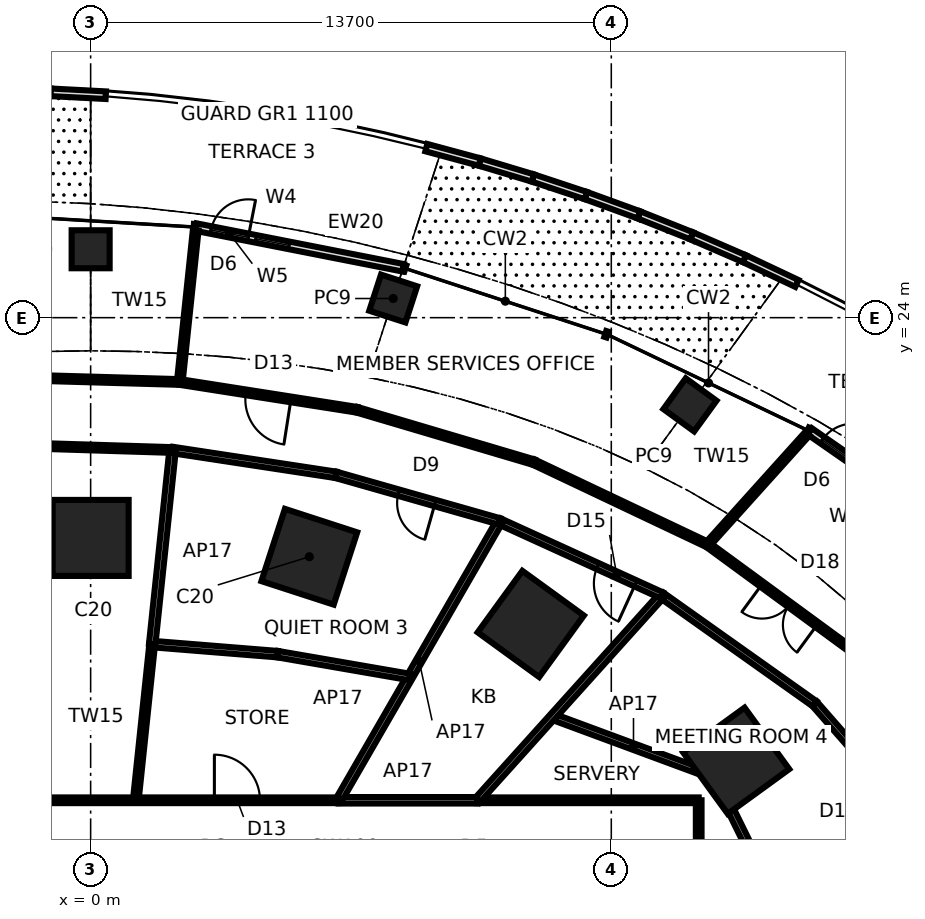
"""IFC4 building model, lengths in metres.
Left out: names, types, materials, properties, quantities, classifications, styles, units other than length and angle.
Written with IfcOpenShell. Run it as: python <this file> out.ifc"""

import sys

from ifc_helpers import new_model, si_unit, direction, frame, frame_2d, origin, origin_2d, place, context, subcontext, project, spatial, rectangle, extrude, element, fill, save


model = new_model("IFC4")
c1 = context("Model", 3, precision=1e-05, world=origin(), true_north=direction((0.0, 1.0)))
c2 = subcontext(c1, "Body", "Model", "MODEL_VIEW")
j1 = project(units=[si_unit("LENGTHUNIT", "METRE"), si_unit("PLANEANGLEUNIT", "RADIAN")], contexts=[c1])
p1 = place(None, origin())
s1 = spatial("IfcSite", under=j1, at=p1, CompositionType="ELEMENT")
p2 = place(p1, origin())
s2 = spatial("IfcBuilding", under=s1, at=p2, CompositionType="ELEMENT")
p3 = place(p2, frame((0.0, 0.0, 15.1)))
s3 = spatial("IfcBuildingStorey", under=s2, at=p3, CompositionType="ELEMENT", Elevation=15.1)
for number, where, z_axis, x_axis in (
    (1, (16.986, 12.341, 0.0), (0.0, 0.0, 1.0), (0.809, 0.588, 0.0)),
    (2, (11.581, 15.94, 0.0), (0.0, 0.0, 1.0), (0.588, 0.809, 0.0)),
    (3, (5.754, 17.708, 0.0), (0.0, 0.0, 1.0), (0.309, 0.951, 0.0)),
    (4, (0.0, 18.204, 0.0), (0.0, 0.0, 1.0), (0.0, 1.0, 0.0)),
):
    element("IfcColumn", number, at=place(p3, frame(where, z_axis=z_axis, x_axis=x_axis)), inside=s3, PredefinedType="COLUMN", context=c2, shape_type="SweptSolid", body=[
        extrude(rectangle(XDim=2.0, YDim=2.0, at=origin_2d()), origin(), (0.0, 0.0, 1.0), 4.5),
    ])
for number, where, z_axis, x_axis in (
    (5, (15.77, 21.705, 0.0), (0.0, 0.0, 1.0), (0.588, 0.809, 0.0)),
    (6, (7.962, 24.504, 0.0), (0.0, 0.0, 1.0), (0.309, 0.951, 0.0)),
    (7, (0.0, 25.8, 0.0), (0.0, 0.0, 1.0), (0.0, 1.0, 0.0)),
):
    element("IfcColumn", number, at=place(p3, frame(where, z_axis=z_axis, x_axis=x_axis)), inside=s3, PredefinedType="COLUMN", context=c2, shape_type="SweptSolid", body=[
        extrude(rectangle(XDim=1.0, YDim=1.0, at=origin_2d()), origin(), (0.0, 0.0, 1.0), 4.5),
    ])
p4 = place(p3, frame((24.03, 17.459, 0.0), z_axis=(0.0, 0.0, 1.0), x_axis=(-0.821240808498, 0.570581750897, 0.0)))
e8 = element("IfcWall", 8, at=p4, inside=s3, PredefinedType="SOLIDWALL", context=c2, shape_type="SweptSolid", body=[
    extrude(rectangle(XDim=6.225, YDim=0.2, at=frame_2d((3.112, 0.0))), origin(), (0.0, 0.0, 1.0), 4.3),
])
p5 = place(p4, frame((4.825, 0.0, 0.0)))
e9 = element("IfcOpeningElement", 9, at=p5, cuts=e8, PredefinedType="OPENING", context=c2, shape_type="SweptSolid", body=[
    extrude(rectangle(XDim=1.0, YDim=2.4, at=frame_2d((0.5, 1.2))), frame((0.0, 0.11, 0.0), z_axis=(0.0, -1.0, 0.0), x_axis=(1.0, 0.0, 0.0)), (0.0, 0.0, 1.0), 0.22),
])
p6 = place(p4, frame((3.725, 0.0, 0.3)))
e10 = element("IfcOpeningElement", 10, at=p6, cuts=e8, PredefinedType="OPENING", context=c2, shape_type="SweptSolid", body=[
    extrude(rectangle(XDim=0.9, YDim=2.1, at=frame_2d((0.45, 1.05))), frame((0.0, 0.11, 0.0), z_axis=(0.0, -1.0, 0.0), x_axis=(1.0, 0.0, 0.0)), (0.0, 0.0, 1.0), 0.22),
])
p7 = place(p4, frame((4.825, 0.0, 2.7)))
e11 = element("IfcOpeningElement", 11, at=p7, cuts=e8, PredefinedType="OPENING", context=c2, shape_type="SweptSolid", body=[
    extrude(rectangle(XDim=1.0, YDim=0.6, at=frame_2d((0.5, 0.3))), frame((0.0, 0.11, 0.0), z_axis=(0.0, -1.0, 0.0), x_axis=(1.0, 0.0, 0.0)), (0.0, 0.0, 1.0), 0.22),
])
p8 = place(p3, frame((8.225, 25.312, 0.0), z_axis=(0.0, 0.0, 1.0), x_axis=(-0.981250898219, 0.192734726359, 0.0)))
e12 = element("IfcWall", 12, at=p8, inside=s3, PredefinedType="SOLIDWALL", context=c2, shape_type="SweptSolid", body=[
    extrude(rectangle(XDim=5.556, YDim=0.2, at=frame_2d((2.778, 0.0))), origin(), (0.0, 0.0, 1.0), 4.3),
])
p9 = place(p8, frame((4.156, 0.0, 0.0)))
e13 = element("IfcOpeningElement", 13, at=p9, cuts=e12, PredefinedType="OPENING", context=c2, shape_type="SweptSolid", body=[
    extrude(rectangle(XDim=1.0, YDim=2.4, at=frame_2d((0.5, 1.2))), frame((0.0, 0.11, 0.0), z_axis=(0.0, -1.0, 0.0), x_axis=(1.0, 0.0, 0.0)), (0.0, 0.0, 1.0), 0.22),
])
p10 = place(p8, frame((3.056, 0.0, 0.3)))
e14 = element("IfcOpeningElement", 14, at=p10, cuts=e12, PredefinedType="OPENING", context=c2, shape_type="SweptSolid", body=[
    extrude(rectangle(XDim=0.9, YDim=2.1, at=frame_2d((0.45, 1.05))), frame((0.0, 0.11, 0.0), z_axis=(0.0, -1.0, 0.0), x_axis=(1.0, 0.0, 0.0)), (0.0, 0.0, 1.0), 0.22),
])
p11 = place(p8, frame((4.156, 0.0, 2.7)))
e15 = element("IfcOpeningElement", 15, at=p11, cuts=e12, PredefinedType="OPENING", context=c2, shape_type="SweptSolid", body=[
    extrude(rectangle(XDim=1.0, YDim=0.6, at=frame_2d((0.5, 0.3))), frame((0.0, 0.11, 0.0), z_axis=(0.0, -1.0, 0.0), x_axis=(1.0, 0.0, 0.0)), (0.0, 0.0, 1.0), 0.22),
])
p12 = place(p3, frame((18.585, 24.9, 0.0), z_axis=(0.0, 0.0, 1.0), x_axis=(-0.904481611799, 0.426512618709, 0.0)))
e16 = element("IfcWall", 16, at=p12, inside=s3, PredefinedType="PARAPET", context=c2, shape_type="SweptSolid", body=[
    extrude(rectangle(XDim=1.528, YDim=0.2, at=frame_2d((0.764, 0.0))), origin(), (0.0, 0.0, 1.0), 1.1),
])
p13 = place(p3, frame((17.203, 25.552, 0.0), z_axis=(0.0, 0.0, 1.0), x_axis=(-0.917549730741, 0.39762104021, 0.0)))
e17 = element("IfcWall", 17, at=p13, inside=s3, PredefinedType="PARAPET", context=c2, shape_type="SweptSolid", body=[
    extrude(rectangle(XDim=1.511, YDim=0.2, at=frame_2d((0.755, 0.0))), origin(), (0.0, 0.0, 1.0), 1.1),
])
p14 = place(p3, frame((15.816, 26.153, 0.0), z_axis=(0.0, 0.0, 1.0), x_axis=(-0.929273809552, 0.369391644303, 0.0)))
e18 = element("IfcWall", 18, at=p14, inside=s3, PredefinedType="PARAPET", context=c2, shape_type="SweptSolid", body=[
    extrude(rectangle(XDim=1.496, YDim=0.2, at=frame_2d((0.748, 0.0))), origin(), (0.0, 0.0, 1.0), 1.1),
])
p15 = place(p3, frame((14.427, 26.705, 0.0), z_axis=(0.0, 0.0, 1.0), x_axis=(-0.939735707592, 0.341901740091, 0.0)))
e19 = element("IfcWall", 19, at=p15, inside=s3, PredefinedType="PARAPET", context=c2, shape_type="SweptSolid", body=[
    extrude(rectangle(XDim=1.482, YDim=0.2, at=frame_2d((0.741, 0.0))), origin(), (0.0, 0.0, 1.0), 1.1),
])
p16 = place(p3, frame((13.033, 27.212, 0.0), z_axis=(0.0, 0.0, 1.0), x_axis=(-0.949196557005, 0.314683803476, 0.0)))
e20 = element("IfcWall", 20, at=p16, inside=s3, PredefinedType="PARAPET", context=c2, shape_type="SweptSolid", body=[
    extrude(rectangle(XDim=1.471, YDim=0.2, at=frame_2d((0.735, 0.0))), origin(), (0.0, 0.0, 1.0), 1.1),
])
p17 = place(p3, frame((11.637, 27.675, 0.0), z_axis=(0.0, 0.0, 1.0), x_axis=(-0.957683640583, 0.2878229396, 0.0)))
e21 = element("IfcWall", 21, at=p17, inside=s3, PredefinedType="PARAPET", context=c2, shape_type="SweptSolid", body=[
    extrude(rectangle(XDim=1.461, YDim=0.2, at=frame_2d((0.731, 0.0))), origin(), (0.0, 0.0, 1.0), 1.1),
])
p18 = place(p3, frame((10.238, 28.095, 0.0), z_axis=(0.0, 0.0, 1.0), x_axis=(-0.965419365496, 0.260701838744, 0.0)))
e22 = element("IfcWall", 22, at=p18, inside=s3, PredefinedType="PARAPET", context=c2, shape_type="SweptSolid", body=[
    extrude(rectangle(XDim=1.454, YDim=0.2, at=frame_2d((0.727, 0.0))), origin(), (0.0, 0.0, 1.0), 1.1),
])
p19 = place(p3, frame((0.398, 29.854, 0.0), z_axis=(0.0, 0.0, 1.0), x_axis=(-0.998632601242, 0.05227741134, 0.0)))
e23 = element("IfcWall", 23, at=p19, inside=s3, PredefinedType="PARAPET", context=c2, shape_type="SweptSolid", body=[
    extrude(rectangle(XDim=1.457, YDim=0.2, at=frame_2d((0.729, 0.0))), origin(), (0.0, 0.0, 1.0), 1.1),
])
p20 = place(p3, frame((16.0, 4.321, 0.0), z_axis=(0.0, 0.0, 1.0), x_axis=(0.0, 1.0, 0.0)))
e24 = element("IfcWall", 24, at=p20, inside=s3, PredefinedType="PARTITIONING", context=c2, shape_type="SweptSolid", body=[
    extrude(rectangle(XDim=6.979, YDim=0.15, at=frame_2d((3.49, 0.0))), origin(), (0.0, 0.0, 1.0), 4.3),
])
p21 = place(p20, frame((2.915, 0.0, 0.0)))
e25 = element("IfcOpeningElement", 25, at=p21, cuts=e24, PredefinedType="OPENING", context=c2, shape_type="SweptSolid", body=[
    extrude(rectangle(XDim=1.2, YDim=2.4, at=frame_2d((0.6, 1.2))), frame((0.0, 0.085, 0.0), z_axis=(0.0, -1.0, 0.0), x_axis=(1.0, 0.0, 0.0)), (0.0, 0.0, 1.0), 0.17),
])
p22 = place(p3, frame((19.049, 13.84, 0.0), z_axis=(0.0, 0.0, 1.0), x_axis=(0.658801352576, -0.752316939756, 0.0)))
e26 = element("IfcWall", 26, at=p22, inside=s3, PredefinedType="PARTITIONING", context=c2, shape_type="SweptSolid", body=[
    extrude(rectangle(XDim=5.125, YDim=0.17, at=frame_2d((2.562, 0.0))), origin(), (0.0, 0.0, 1.0), 4.3),
])
p23 = place(p22, frame((2.012, 0.0, 0.0)))
e27 = element("IfcOpeningElement", 27, at=p23, cuts=e26, PredefinedType="OPENING", context=c2, shape_type="SweptSolid", body=[
    extrude(rectangle(XDim=1.1, YDim=2.4, at=frame_2d((0.55, 1.2))), frame((0.0, 0.095, 0.0), z_axis=(0.0, -1.0, 0.0), x_axis=(1.0, 0.0, 0.0)), (0.0, 0.0, 1.0), 0.19),
])
p24 = place(p3, frame((16.413, 11.925, 0.0), z_axis=(0.0, 0.0, 1.0), x_axis=(0.44142043443, -0.897300395669, 0.0)))
e28 = element("IfcWall", 28, at=p24, inside=s3, PredefinedType="PARTITIONING", context=c2, shape_type="SweptSolid", body=[
    extrude(rectangle(XDim=4.221, YDim=0.17, at=frame_2d((2.111, 0.0))), origin(), (0.0, 0.0, 1.0), 4.3),
])
p25 = place(p3, frame((16.0, 11.3, 0.0), z_axis=(0.0, 0.0, 1.0), x_axis=(-1.0, 0.0, 0.0)))
e29 = element("IfcWall", 29, at=p25, inside=s3, PredefinedType="PARTITIONING", context=c2, shape_type="SweptSolid", body=[
    extrude(rectangle(XDim=5.825, YDim=0.15, at=frame_2d((2.913, 0.0))), origin(), (0.0, 0.0, 1.0), 4.3),
])
p26 = place(p3, frame((12.156, 13.5, 0.0), z_axis=(0.0, 0.0, 1.0), x_axis=(0.937814922048, -0.34713566798, 0.0)))
e30 = element("IfcWall", 30, at=p26, inside=s3, PredefinedType="PARTITIONING", context=c2, shape_type="SweptSolid", body=[
    extrude(rectangle(XDim=4.539, YDim=0.17, at=frame_2d((2.27, 0.0))), origin(), (0.0, 0.0, 1.0), 4.3),
])
p27 = place(p3, frame((15.029, 16.692, 0.0), z_axis=(0.0, 0.0, 1.0), x_axis=(0.815613464498, -0.578597162566, 0.0)))
e31 = element("IfcWall", 31, at=p27, inside=s3, PredefinedType="PARTITIONING", context=c2, shape_type="SweptSolid", body=[
    extrude(rectangle(XDim=4.929, YDim=0.17, at=frame_2d((2.464, 0.0))), origin(), (0.0, 0.0, 1.0), 4.3),
])
p28 = place(p3, frame((20.506, 14.898, 0.0), z_axis=(0.0, 0.0, 1.0), x_axis=(-0.806517819775, 0.591209782045, 0.0)))
e32 = element("IfcWall", 32, at=p28, inside=s3, PredefinedType="PARTITIONING", context=c2, shape_type="SweptSolid", body=[
    extrude(rectangle(XDim=5.296, YDim=0.15, at=frame_2d((2.648, 0.0))), origin(), (0.0, 0.0, 1.0), 4.3),
])
p29 = place(p28, frame((1.723, 0.0, 0.0)))
e33 = element("IfcOpeningElement", 33, at=p29, cuts=e32, PredefinedType="OPENING", context=c2, shape_type="SweptSolid", body=[
    extrude(rectangle(XDim=1.8, YDim=2.4, at=frame_2d((0.9, 1.2))), frame((0.0, 0.085, 0.0), z_axis=(0.0, -1.0, 0.0), x_axis=(1.0, 0.0, 0.0)), (0.0, 0.0, 1.0), 0.17),
])
p30 = place(p3, frame((15.029, 16.692, 0.0), z_axis=(0.0, 0.0, 1.0), x_axis=(-0.669122739593, -0.74315190867, 0.0)))
e34 = element("IfcWall", 34, at=p30, inside=s3, PredefinedType="PARTITIONING", context=c2, shape_type="SweptSolid", body=[
    extrude(rectangle(XDim=7.255, YDim=0.17, at=frame_2d((3.628, 0.0))), origin(), (0.0, 0.0, 1.0), 4.3),
])
p31 = place(p3, frame((16.234, 18.03, 0.0), z_axis=(0.0, 0.0, 1.0), x_axis=(0.669125969655, 0.743149000358, 0.0)))
e35 = element("IfcWall", 35, at=p31, inside=s3, PredefinedType="PARTITIONING", context=c2, shape_type="SweptSolid", body=[
    extrude(rectangle(XDim=3.931, YDim=0.15, at=frame_2d((1.966, 0.0))), origin(), (0.0, 0.0, 1.0), 4.3),
])
p32 = place(p3, frame((10.175, 11.3, 0.0), z_axis=(0.0, 0.0, 1.0), x_axis=(-1.0, 0.0, 0.0)))
e36 = element("IfcWall", 36, at=p32, inside=s3, PredefinedType="PARTITIONING", context=c2, shape_type="SweptSolid", body=[
    extrude(rectangle(XDim=3.65, YDim=0.17, at=frame_2d((1.825, 0.0))), origin(), (0.0, 0.0, 1.0), 4.3),
])
p33 = place(p3, frame((10.761, 18.639, 0.0), z_axis=(0.0, 0.0, 1.0), x_axis=(0.909832836999, -0.414974949507, 0.0)))
e37 = element("IfcWall", 37, at=p33, inside=s3, PredefinedType="PARTITIONING", context=c2, shape_type="SweptSolid", body=[
    extrude(rectangle(XDim=4.691, YDim=0.17, at=frame_2d((2.346, 0.0))), origin(), (0.0, 0.0, 1.0), 4.3),
])
p34 = place(p33, frame((2.836, 0.0, 0.0)))
e38 = element("IfcOpeningElement", 38, at=p34, cuts=e37, PredefinedType="OPENING", context=c2, shape_type="SweptSolid", body=[
    extrude(rectangle(XDim=1.1, YDim=2.4, at=frame_2d((0.55, 1.2))), frame((0.0, 0.095, 0.0), z_axis=(0.0, -1.0, 0.0), x_axis=(1.0, 0.0, 0.0)), (0.0, 0.0, 1.0), 0.19),
])
p35 = place(p3, frame((16.234, 18.03, 0.0), z_axis=(0.0, 0.0, 1.0), x_axis=(-0.90359929016, 0.42837871425, 0.0)))
e39 = element("IfcWall", 39, at=p35, inside=s3, PredefinedType="PARTITIONING", context=c2, shape_type="SweptSolid", body=[
    extrude(rectangle(XDim=5.061, YDim=0.15, at=frame_2d((2.53, 0.0))), origin(), (0.0, 0.0, 1.0), 4.3),
])
p36 = place(p3, frame((6.524, 11.3, 0.0), z_axis=(0.0, 0.0, 1.0), x_axis=(0.499987645576, 0.866032536497, 0.0)))
e40 = element("IfcWall", 40, at=p36, inside=s3, PredefinedType="PARTITIONING", context=c2, shape_type="SweptSolid", body=[
    extrude(rectangle(XDim=8.474, YDim=0.17, at=frame_2d((4.237, 0.0))), origin(), (0.0, 0.0, 1.0), 4.3),
])
p37 = place(p3, frame((4.921, 15.145, 0.0), z_axis=(0.0, 0.0, 1.0), x_axis=(0.985365262951, -0.170456148522, 0.0)))
e41 = element("IfcWall", 41, at=p37, inside=s3, PredefinedType="PARTITIONING", context=c2, shape_type="SweptSolid", body=[
    extrude(rectangle(XDim=3.528, YDim=0.17, at=frame_2d((1.764, 0.0))), origin(), (0.0, 0.0, 1.0), 4.3),
])
p38 = place(p3, frame((6.454, 19.864, 0.0), z_axis=(0.0, 0.0, 1.0), x_axis=(0.96184425832, -0.273597556162, 0.0)))
e42 = element("IfcWall", 42, at=p38, inside=s3, PredefinedType="PARTITIONING", context=c2, shape_type="SweptSolid", body=[
    extrude(rectangle(XDim=4.478, YDim=0.17, at=frame_2d((2.239, 0.0))), origin(), (0.0, 0.0, 1.0), 4.3),
])
p39 = place(p38, frame((1.714, 0.0, 0.0)))
e43 = element("IfcOpeningElement", 43, at=p39, cuts=e42, PredefinedType="OPENING", context=c2, shape_type="SweptSolid", body=[
    extrude(rectangle(XDim=1.0, YDim=2.4, at=frame_2d((0.5, 1.2))), frame((0.0, 0.095, 0.0), z_axis=(0.0, -1.0, 0.0), x_axis=(1.0, 0.0, 0.0)), (0.0, 0.0, 1.0), 0.19),
])
p40 = place(p3, frame((11.661, 20.198, 0.0), z_axis=(0.0, 0.0, 1.0), x_axis=(-0.958786433203, 0.284127745049, 0.0)))
e44 = element("IfcWall", 44, at=p40, inside=s3, PredefinedType="PARTITIONING", context=c2, shape_type="SweptSolid", body=[
    extrude(rectangle(XDim=4.851, YDim=0.15, at=frame_2d((2.425, 0.0))), origin(), (0.0, 0.0, 1.0), 4.3),
])
p41 = place(p3, frame((1.62, 15.411, 0.0), z_axis=(0.0, 0.0, 1.0), x_axis=(0.996778134856, -0.08020816587, 0.0)))
e45 = element("IfcWall", 45, at=p41, inside=s3, PredefinedType="PARTITIONING", context=c2, shape_type="SweptSolid", body=[
    extrude(rectangle(XDim=3.312, YDim=0.17, at=frame_2d((1.656, 0.0))), origin(), (0.0, 0.0, 1.0), 4.3),
])
p42 = place(p3, frame((2.156, 20.517, 0.0), z_axis=(0.0, 0.0, 1.0), x_axis=(0.988633178346, -0.150347725867, 0.0)))
e46 = element("IfcWall", 46, at=p42, inside=s3, PredefinedType="PARTITIONING", context=c2, shape_type="SweptSolid", body=[
    extrude(rectangle(XDim=4.347, YDim=0.17, at=frame_2d((2.173, 0.0))), origin(), (0.0, 0.0, 1.0), 4.3),
])
p43 = place(p3, frame((7.01, 21.576, 0.0), z_axis=(0.0, 0.0, 1.0), x_axis=(-0.987917974558, 0.154977661437, 0.0)))
e47 = element("IfcWall", 47, at=p43, inside=s3, PredefinedType="PARTITIONING", context=c2, shape_type="SweptSolid", body=[
    extrude(rectangle(XDim=4.723, YDim=0.15, at=frame_2d((2.361, 0.0))), origin(), (0.0, 0.0, 1.0), 4.3),
])
p44 = place(p43, frame((1.761, 0.0, 0.0)))
e48 = element("IfcOpeningElement", 48, at=p44, cuts=e47, PredefinedType="OPENING", context=c2, shape_type="SweptSolid", body=[
    extrude(rectangle(XDim=1.2, YDim=2.4, at=frame_2d((0.6, 1.2))), frame((0.0, 0.085, 0.0), z_axis=(0.0, -1.0, 0.0), x_axis=(1.0, 0.0, 0.0)), (0.0, 0.0, 1.0), 0.17),
])
p45 = place(p3, frame((1.188, 11.3, 0.0), z_axis=(0.0, 0.0, 1.0), x_axis=(0.104543353399, 0.99452033024, 0.0)))
e49 = element("IfcWall", 49, at=p45, inside=s3, PredefinedType="PARTITIONING", context=c2, shape_type="SweptSolid", body=[
    extrude(rectangle(XDim=4.134, YDim=0.15, at=frame_2d((2.067, 0.0))), origin(), (0.0, 0.0, 1.0), 4.3),
])
p46 = place(p3, frame((2.156, 20.517, 0.0), z_axis=(0.0, 0.0, 1.0), x_axis=(-0.104511524142, -0.994523675596, 0.0)))
e50 = element("IfcWall", 50, at=p46, inside=s3, PredefinedType="PARTITIONING", context=c2, shape_type="SweptSolid", body=[
    extrude(rectangle(XDim=5.135, YDim=0.17, at=frame_2d((2.567, 0.0))), origin(), (0.0, 0.0, 1.0), 4.3),
])
p47 = place(p3, frame((2.344, 22.308, 0.0), z_axis=(0.0, 0.0, 1.0), x_axis=(0.104567758594, 0.994517764478, 0.0)))
e51 = element("IfcWall", 51, at=p47, inside=s3, PredefinedType="PARTITIONING", context=c2, shape_type="SweptSolid", body=[
    extrude(rectangle(XDim=4.018, YDim=0.15, at=frame_2d((2.009, 0.0))), origin(), (0.0, 0.0, 1.0), 4.3),
])
p48 = place(p3, frame((2.344, 22.308, 0.0), z_axis=(0.0, 0.0, 1.0), x_axis=(-0.999601512032, 0.028227949675, 0.0)))
e52 = element("IfcWall", 52, at=p48, inside=s3, PredefinedType="PARTITIONING", context=c2, shape_type="SweptSolid", body=[
    extrude(rectangle(XDim=4.705, YDim=0.15, at=frame_2d((2.353, 0.0))), origin(), (0.0, 0.0, 1.0), 4.3),
])
p49 = place(p3, frame((-2.17, 20.65, 0.0), z_axis=(0.0, 0.0, 1.0), x_axis=(0.999527523015, -0.030736472383, 0.0)))
e53 = element("IfcWall", 53, at=p49, inside=s3, PredefinedType="PARTITIONING", context=c2, shape_type="SweptSolid", body=[
    extrude(rectangle(XDim=4.329, YDim=0.15, at=frame_2d((2.165, 0.0))), origin(), (0.0, 0.0, 1.0), 4.3),
])
p50 = place(p3, frame((6.524, 11.3, 0.0), z_axis=(0.0, 0.0, 1.0), x_axis=(-1.0, 0.0, 0.0)))
e54 = element("IfcWall", 54, at=p50, inside=s3, PredefinedType="PARTITIONING", context=c2, shape_type="SweptSolid", body=[
    extrude(rectangle(XDim=22.524, YDim=0.15, at=frame_2d((11.262, 0.0))), origin(), (0.0, 0.0, 1.0), 4.3),
])
p51 = place(p50, frame((10.393, 0.0, 0.0)))
e55 = element("IfcOpeningElement", 55, at=p51, cuts=e54, PredefinedType="OPENING", context=c2, shape_type="SweptSolid", body=[
    extrude(rectangle(XDim=1.2, YDim=2.4, at=frame_2d((0.6, 1.2))), frame((0.0, 0.085, 0.0), z_axis=(0.0, -1.0, 0.0), x_axis=(1.0, 0.0, 0.0)), (0.0, 0.0, 1.0), 0.17),
])
p52 = place(p50, frame((2.068, 0.0, 0.0)))
e56 = element("IfcOpeningElement", 56, at=p52, cuts=e54, PredefinedType="OPENING", context=c2, shape_type="SweptSolid", body=[
    extrude(rectangle(XDim=1.2, YDim=2.4, at=frame_2d((0.6, 1.2))), frame((0.0, 0.085, 0.0), z_axis=(0.0, -1.0, 0.0), x_axis=(1.0, 0.0, 0.0)), (0.0, 0.0, 1.0), 0.17),
])
p53 = place(p5, frame((1.0, 0.0, 0.0), z_axis=(0.0, 0.0, 1.0), x_axis=(-1.0, 0.0, 0.0)))
e57 = element("IfcDoor", 57, at=p53, inside=s3, OperationType="SINGLE_SWING_RIGHT", PredefinedType="DOOR", context=c2, shape_type="SweptSolid", body=[
    extrude(rectangle(XDim=1.0, YDim=2.4, at=frame_2d((0.5, 1.2))), frame((0.0, 0.025, 0.0), z_axis=(0.0, -1.0, 0.0), x_axis=(1.0, 0.0, 0.0)), (0.0, 0.0, 1.0), 0.05),
])
fill(e9, e57)
p54 = place(p7, origin())
e58 = element("IfcWindow", 58, at=p54, inside=s3, PartitioningType="SINGLE_PANEL", PredefinedType="WINDOW", context=c2, shape_type="SweptSolid", body=[
    extrude(rectangle(XDim=1.0, YDim=0.6, at=frame_2d((0.5, 0.3))), frame((0.0, 0.03, 0.0), z_axis=(0.0, -1.0, 0.0), x_axis=(1.0, 0.0, 0.0)), (0.0, 0.0, 1.0), 0.06),
])
fill(e11, e58)
p55 = place(p9, frame((1.0, 0.0, 0.0), z_axis=(0.0, 0.0, 1.0), x_axis=(-1.0, 0.0, 0.0)))
e59 = element("IfcDoor", 59, at=p55, inside=s3, OperationType="SINGLE_SWING_RIGHT", PredefinedType="DOOR", context=c2, shape_type="SweptSolid", body=[
    extrude(rectangle(XDim=1.0, YDim=2.4, at=frame_2d((0.5, 1.2))), frame((0.0, 0.025, 0.0), z_axis=(0.0, -1.0, 0.0), x_axis=(1.0, 0.0, 0.0)), (0.0, 0.0, 1.0), 0.05),
])
fill(e13, e59)
p56 = place(p10, origin())
e60 = element("IfcWindow", 60, at=p56, inside=s3, PartitioningType="SINGLE_PANEL", PredefinedType="WINDOW", context=c2, shape_type="SweptSolid", body=[
    extrude(rectangle(XDim=0.9, YDim=2.1, at=frame_2d((0.45, 1.05))), frame((0.0, 0.03, 0.0), z_axis=(0.0, -1.0, 0.0), x_axis=(1.0, 0.0, 0.0)), (0.0, 0.0, 1.0), 0.06),
])
fill(e14, e60)
p57 = place(p11, origin())
e61 = element("IfcWindow", 61, at=p57, inside=s3, PartitioningType="SINGLE_PANEL", PredefinedType="WINDOW", context=c2, shape_type="SweptSolid", body=[
    extrude(rectangle(XDim=1.0, YDim=0.6, at=frame_2d((0.5, 0.3))), frame((0.0, 0.03, 0.0), z_axis=(0.0, -1.0, 0.0), x_axis=(1.0, 0.0, 0.0)), (0.0, 0.0, 1.0), 0.06),
])
fill(e15, e61)
p58 = place(p34, frame((1.1, 0.0, 0.0), z_axis=(0.0, 0.0, 1.0), x_axis=(-1.0, 0.0, 0.0)))
e62 = element("IfcDoor", 62, at=p58, inside=s3, OperationType="SINGLE_SWING_LEFT", PredefinedType="DOOR", context=c2, shape_type="SweptSolid", body=[
    extrude(rectangle(XDim=1.1, YDim=2.4, at=frame_2d((0.55, 1.2))), frame((0.0, 0.025, 0.0), z_axis=(0.0, -1.0, 0.0), x_axis=(1.0, 0.0, 0.0)), (0.0, 0.0, 1.0), 0.05),
])
fill(e38, e62)
p59 = place(p52, frame((1.2, 0.0, 0.0), z_axis=(0.0, 0.0, 1.0), x_axis=(-1.0, 0.0, 0.0)))
e63 = element("IfcDoor", 63, at=p59, inside=s3, OperationType="SINGLE_SWING_LEFT", PredefinedType="DOOR", context=c2, shape_type="SweptSolid", body=[
    extrude(rectangle(XDim=1.2, YDim=2.4, at=frame_2d((0.6, 1.2))), frame((0.0, 0.025, 0.0), z_axis=(0.0, -1.0, 0.0), x_axis=(1.0, 0.0, 0.0)), (0.0, 0.0, 1.0), 0.05),
])
fill(e56, e63)
p60 = place(p39, frame((1.0, 0.0, 0.0), z_axis=(0.0, 0.0, 1.0), x_axis=(-1.0, 0.0, 0.0)))
e64 = element("IfcDoor", 64, at=p60, inside=s3, OperationType="SINGLE_SWING_LEFT", PredefinedType="DOOR", context=c2, shape_type="SweptSolid", body=[
    extrude(rectangle(XDim=1.0, YDim=2.4, at=frame_2d((0.5, 1.2))), frame((0.0, 0.025, 0.0), z_axis=(0.0, -1.0, 0.0), x_axis=(1.0, 0.0, 0.0)), (0.0, 0.0, 1.0), 0.05),
])
fill(e43, e64)
p61 = place(p29, origin())
e65 = element("IfcDoor", 65, at=p61, inside=s3, OperationType="DOUBLE_DOOR_SINGLE_SWING", PredefinedType="DOOR", context=c2, shape_type="SweptSolid", body=[
    extrude(rectangle(XDim=1.8, YDim=2.4, at=frame_2d((0.9, 1.2))), frame((0.0, 0.025, 0.0), z_axis=(0.0, -1.0, 0.0), x_axis=(1.0, 0.0, 0.0)), (0.0, 0.0, 1.0), 0.05),
])
fill(e33, e65)
p62 = place(p44, origin())
e66 = element("IfcDoor", 66, at=p62, inside=s3, OperationType="SINGLE_SWING_LEFT", PredefinedType="DOOR", context=c2, shape_type="SweptSolid", body=[
    extrude(rectangle(XDim=1.2, YDim=2.4, at=frame_2d((0.6, 1.2))), frame((0.0, 0.025, 0.0), z_axis=(0.0, -1.0, 0.0), x_axis=(1.0, 0.0, 0.0)), (0.0, 0.0, 1.0), 0.05),
])
fill(e48, e66)
save(model, sys.argv[1])
